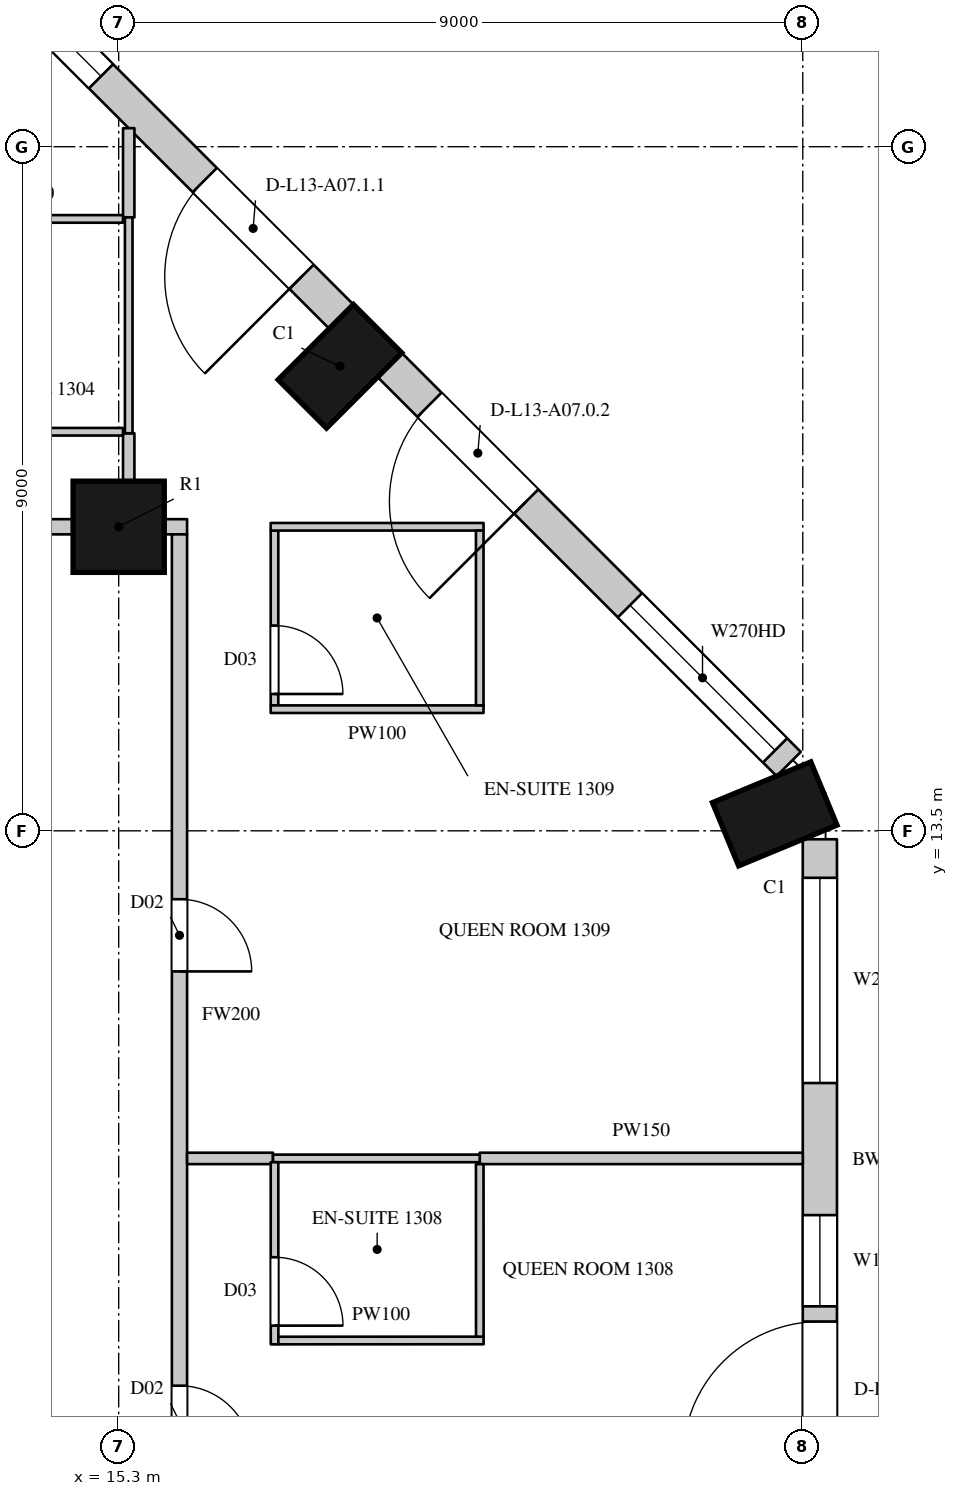
"""IFC4 building model, lengths in metres.
Left out: names, types, materials, properties, quantities, classifications, styles, units other than length and angle.
Written with IfcOpenShell. Run it as: python <this file> out.ifc"""

import sys

from ifc_helpers import new_model, si_unit, direction, frame, frame_2d, origin, origin_2d, place, context, subcontext, project, spatial, rectangle, circle, extrude, element, fill, save


model = new_model("IFC4")
c1 = context("Model", 3, precision=1e-05, world=origin(), true_north=direction((0.0, 1.0)))
c2 = subcontext(c1, "Body", "Model", "MODEL_VIEW")
j1 = project(units=[si_unit("LENGTHUNIT", "METRE"), si_unit("PLANEANGLEUNIT", "RADIAN")], contexts=[c1])
p1 = place(None, origin())
s1 = spatial("IfcSite", under=j1, at=p1, CompositionType="ELEMENT")
p2 = place(p1, origin())
s2 = spatial("IfcBuilding", under=s1, at=p2, CompositionType="ELEMENT")
p3 = place(p2, frame((0.0, 0.0, 77.1)))
s3 = spatial("IfcBuildingStorey", under=s2, at=p3, CompositionType="ELEMENT", Elevation=77.1)
for number, where, z_axis, x_axis in (
    (1, (23.931, 13.723, 0.0), (0.0, 0.0, 1.0), (-0.383, 0.924, 0.0)),
    (2, (18.211, 19.611, 0.0), (0.0, 0.0, 1.0), (-0.707, 0.707, 0.0)),
):
    element("IfcColumn", number, at=place(p3, frame(where, z_axis=z_axis, x_axis=x_axis)), inside=s3, PredefinedType="COLUMN", context=c2, shape_type="SweptSolid", body=[
        extrude(rectangle(XDim=0.9, YDim=1.4, at=origin_2d()), origin(), (0.0, 0.0, 1.0), 3.6),
    ])
p4 = place(p3, frame((15.3, 17.5, 0.0), z_axis=(0.0, 0.0, 1.0), x_axis=(1.0, 0.0, 0.0)))
e3 = element("IfcColumn", 3, at=p4, inside=s3, PredefinedType="COLUMN", context=c2, shape_type="SweptSolid", body=[
    extrude(circle(Radius=0.6, at=origin_2d()), origin(), (0.0, 0.0, 1.0), 3.6),
])
p5 = place(p3, frame((24.525, 4.95, 0.0), z_axis=(0.0, 0.0, 1.0), x_axis=(0.0, 1.0, 0.0)))
e4 = element("IfcWall", 4, at=p5, inside=s3, PredefinedType="SOLIDWALL", context=c2, shape_type="SweptSolid", body=[
    extrude(rectangle(XDim=8.439, YDim=0.45, at=frame_2d((4.219, 0.0))), origin(), (0.0, 0.0, 1.0), 3.3),
])
p6 = place(p5, frame((0.294, 0.0, 0.0)))
e5 = element("IfcOpeningElement", 5, at=p6, cuts=e4, PredefinedType="OPENING", context=c2, shape_type="SweptSolid", body=[
    extrude(rectangle(XDim=1.8, YDim=2.4, at=frame_2d((0.9, 1.2))), frame((0.0, 0.235, 0.0), z_axis=(0.0, -1.0, 0.0), x_axis=(1.0, 0.0, 0.0)), (0.0, 0.0, 1.0), 0.47),
])
p7 = place(p5, frame((2.294, 0.0, 1.05)))
e6 = element("IfcOpeningElement", 6, at=p7, cuts=e4, PredefinedType="OPENING", context=c2, shape_type="SweptSolid", body=[
    extrude(rectangle(XDim=1.2, YDim=2.0, at=frame_2d((0.6, 1.0))), frame((0.0, 0.235, 0.0), z_axis=(0.0, -1.0, 0.0), x_axis=(1.0, 0.0, 0.0)), (0.0, 0.0, 1.0), 0.47),
])
p8 = place(p5, frame((5.232, 0.0, 1.05)))
e7 = element("IfcOpeningElement", 7, at=p8, cuts=e4, PredefinedType="OPENING", context=c2, shape_type="SweptSolid", body=[
    extrude(rectangle(XDim=2.7, YDim=2.0, at=frame_2d((1.35, 1.0))), frame((0.0, 0.235, 0.0), z_axis=(0.0, -1.0, 0.0), x_axis=(1.0, 0.0, 0.0)), (0.0, 0.0, 1.0), 0.47),
])
p9 = place(p3, frame((24.115, 14.379, 0.0), z_axis=(0.0, 0.0, 1.0), x_axis=(-0.707106781187, 0.707106781187, 0.0)))
e8 = element("IfcWall", 8, at=p9, inside=s3, PredefinedType="SOLIDWALL", context=c2, shape_type="SweptSolid", body=[
    extrude(rectangle(XDim=7.424, YDim=0.45, at=frame_2d((3.712, 0.0))), origin(), (0.0, 0.0, 1.0), 3.3),
])
p10 = place(p9, frame((0.253, 0.0, 1.05)))
e9 = element("IfcOpeningElement", 9, at=p10, cuts=e8, PredefinedType="OPENING", context=c2, shape_type="SweptSolid", body=[
    extrude(rectangle(XDim=2.7, YDim=2.0, at=frame_2d((1.35, 1.0))), frame((0.0, 0.235, 0.0), z_axis=(0.0, -1.0, 0.0), x_axis=(1.0, 0.0, 0.0)), (0.0, 0.0, 1.0), 0.47),
])
p11 = place(p9, frame((4.884, 0.0, 0.0)))
e10 = element("IfcOpeningElement", 10, at=p11, cuts=e8, PredefinedType="OPENING", context=c2, shape_type="SweptSolid", body=[
    extrude(rectangle(XDim=1.8, YDim=2.4, at=frame_2d((0.9, 1.2))), frame((0.0, 0.235, 0.0), z_axis=(0.0, -1.0, 0.0), x_axis=(1.0, 0.0, 0.0)), (0.0, 0.0, 1.0), 0.47),
])
p12 = place(p3, frame((18.229, 20.265, 0.0), z_axis=(0.0, 0.0, 1.0), x_axis=(-0.707106781187, 0.707106781187, 0.0)))
e11 = element("IfcWall", 11, at=p12, inside=s3, PredefinedType="SOLIDWALL", context=c2, shape_type="SweptSolid", body=[
    extrude(rectangle(XDim=7.424, YDim=0.45, at=frame_2d((3.712, 0.0))), origin(), (0.0, 0.0, 1.0), 3.3),
])
p13 = place(p12, frame((0.74, 0.0, 0.0)))
e12 = element("IfcOpeningElement", 12, at=p13, cuts=e11, PredefinedType="OPENING", context=c2, shape_type="SweptSolid", body=[
    extrude(rectangle(XDim=1.8, YDim=2.4, at=frame_2d((0.9, 1.2))), frame((0.0, 0.235, 0.0), z_axis=(0.0, -1.0, 0.0), x_axis=(1.0, 0.0, 0.0)), (0.0, 0.0, 1.0), 0.47),
])
p14 = place(p12, frame((4.471, 0.0, 1.05)))
e13 = element("IfcOpeningElement", 13, at=p14, cuts=e11, PredefinedType="OPENING", context=c2, shape_type="SweptSolid", body=[
    extrude(rectangle(XDim=2.7, YDim=2.0, at=frame_2d((1.35, 1.0))), frame((0.0, 0.235, 0.0), z_axis=(0.0, -1.0, 0.0), x_axis=(1.0, 0.0, 0.0)), (0.0, 0.0, 1.0), 0.47),
])
p15 = place(p3, frame((23.15, 16.864, 0.0), z_axis=(0.0, 0.0, 1.0), x_axis=(-0.707106781187, 0.707106781187, 0.0)))
e14 = element("IfcWall", 14, at=p15, inside=s3, PredefinedType="SOLIDWALL", context=c2, shape_type="SweptSolid", body=[
    extrude(rectangle(XDim=1.445, YDim=0.45, at=frame_2d((0.722, 0.0))), origin(), (0.0, 0.0, 1.0), 0.6),
])
p16 = place(p3, frame((19.937, 20.078, 0.0), z_axis=(0.0, 0.0, 1.0), x_axis=(-0.707106781187, 0.707106781187, 0.0)))
e15 = element("IfcWall", 15, at=p16, inside=s3, PredefinedType="SOLIDWALL", context=c2, shape_type="SweptSolid", body=[
    extrude(rectangle(XDim=1.781, YDim=0.45, at=frame_2d((0.89, 0.0))), origin(), (0.0, 0.0, 1.0), 0.6),
])
p17 = place(p3, frame((16.486, 23.529, 0.0), z_axis=(0.0, 0.0, 1.0), x_axis=(-0.707022305137, 0.707191247145, 0.0)))
e16 = element("IfcWall", 16, at=p17, inside=s3, PredefinedType="SOLIDWALL", context=c2, shape_type="SweptSolid", body=[
    extrude(rectangle(XDim=1.445, YDim=0.45, at=frame_2d((0.723, 0.0))), origin(), (0.0, 0.0, 1.0), 0.6),
])
p18 = place(p3, frame((6.9, 17.5, 0.0), z_axis=(0.0, 0.0, 1.0), x_axis=(1.0, 0.0, 0.0)))
e17 = element("IfcWall", 17, at=p18, inside=s3, PredefinedType="PARTITIONING", context=c2, shape_type="SweptSolid", body=[
    extrude(rectangle(XDim=7.8, YDim=0.2, at=frame_2d((3.9, 0.0))), origin(), (0.0, 0.0, 1.0), 2.75),
])
p19 = place(p18, frame((1.45, 0.0, 0.0)))
e18 = element("IfcOpeningElement", 18, at=p19, cuts=e17, PredefinedType="OPENING", context=c2, shape_type="SweptSolid", body=[
    extrude(rectangle(XDim=1.1, YDim=2.4, at=frame_2d((0.55, 1.2))), frame((0.0, 0.11, 0.0), z_axis=(0.0, -1.0, 0.0), x_axis=(1.0, 0.0, 0.0)), (0.0, 0.0, 1.0), 0.22),
])
p20 = place(p3, frame((15.9, 17.5, 0.0), z_axis=(0.0, 0.0, 1.0), x_axis=(1.0, 0.0, 0.0)))
e19 = element("IfcWall", 19, at=p20, inside=s3, PredefinedType="PARTITIONING", context=c2, shape_type="SweptSolid", body=[
    extrude(rectangle(XDim=0.3, YDim=0.2, at=frame_2d((0.15, 0.0))), origin(), (0.0, 0.0, 1.0), 3.3),
])
p21 = place(p3, frame((16.1, 4.75, 0.0), z_axis=(0.0, 0.0, 1.0), x_axis=(0.0, 1.0, 0.0)))
e20 = element("IfcWall", 20, at=p21, inside=s3, PredefinedType="PARTITIONING", context=c2, shape_type="SweptSolid", body=[
    extrude(rectangle(XDim=12.65, YDim=0.2, at=frame_2d((6.325, 0.0))), origin(), (0.0, 0.0, 1.0), 3.3),
])
p22 = place(p21, frame((0.5, 0.0, 0.0)))
e21 = element("IfcOpeningElement", 21, at=p22, cuts=e20, PredefinedType="OPENING", context=c2, shape_type="SweptSolid", body=[
    extrude(rectangle(XDim=0.95, YDim=2.2, at=frame_2d((0.475, 1.1))), frame((0.0, 0.11, 0.0), z_axis=(0.0, -1.0, 0.0), x_axis=(1.0, 0.0, 0.0)), (0.0, 0.0, 1.0), 0.22),
])
p23 = place(p21, frame((6.9, 0.0, 0.0)))
e22 = element("IfcOpeningElement", 22, at=p23, cuts=e20, PredefinedType="OPENING", context=c2, shape_type="SweptSolid", body=[
    extrude(rectangle(XDim=0.95, YDim=2.2, at=frame_2d((0.475, 1.1))), frame((0.0, 0.11, 0.0), z_axis=(0.0, -1.0, 0.0), x_axis=(1.0, 0.0, 0.0)), (0.0, 0.0, 1.0), 0.22),
])
p24 = place(p3, frame((15.432, 18.094, 0.0), z_axis=(0.0, 0.0, 1.0), x_axis=(0.0, 1.0, 0.0)))
e23 = element("IfcWall", 23, at=p24, inside=s3, PredefinedType="PARTITIONING", context=c2, shape_type="SweptSolid", body=[
    extrude(rectangle(XDim=0.636, YDim=0.15, at=frame_2d((0.318, 0.0))), origin(), (0.0, 0.0, 1.0), 3.3),
])
p25 = place(p3, frame((15.432, 21.57, 0.0), z_axis=(0.0, 0.0, 1.0), x_axis=(0.0, 1.0, 0.0)))
e24 = element("IfcWall", 24, at=p25, inside=s3, PredefinedType="PARTITIONING", context=c2, shape_type="SweptSolid", body=[
    extrude(rectangle(XDim=1.174, YDim=0.15, at=frame_2d((0.587, 0.0))), origin(), (0.0, 0.0, 1.0), 3.3),
])
p26 = place(p3, frame((16.2, 9.19, 0.0), z_axis=(0.0, 0.0, 1.0), x_axis=(1.0, 0.0, 0.0)))
e25 = element("IfcWall", 25, at=p26, inside=s3, PredefinedType="PARTITIONING", context=c2, shape_type="SweptSolid", body=[
    extrude(rectangle(XDim=1.13, YDim=0.15, at=frame_2d((0.565, 0.0))), origin(), (0.0, 0.0, 1.0), 2.65),
])
p27 = place(p3, frame((20.05, 9.19, 0.0), z_axis=(0.0, 0.0, 1.0), x_axis=(1.0, 0.0, 0.0)))
e26 = element("IfcWall", 26, at=p27, inside=s3, PredefinedType="PARTITIONING", context=c2, shape_type="SweptSolid", body=[
    extrude(rectangle(XDim=4.25, YDim=0.15, at=frame_2d((2.125, 0.0))), origin(), (0.0, 0.0, 1.0), 2.65),
])
for number, where, z_axis, x_axis in (
    (27, (12.786, 18.75, 0.0), (0.0, 0.0, 1.0), (1.0, 0.0, 0.0)),
    (28, (12.786, 21.55, 0.0), (0.0, 0.0, 1.0), (1.0, 0.0, 0.0)),
):
    element("IfcWall", number, at=place(p3, frame(where, z_axis=z_axis, x_axis=x_axis)), inside=s3, PredefinedType="PARTITIONING", context=c2, shape_type="SweptSolid", body=[
        extrude(rectangle(XDim=2.571, YDim=0.1, at=frame_2d((1.286, 0.0))), origin(), (0.0, 0.0, 1.0), 3.3),
    ])
p28 = place(p3, frame((15.432, 18.73, 0.0), z_axis=(0.0, 0.0, 1.0), x_axis=(0.0, 1.0, 0.0)))
e29 = element("IfcWall", 29, at=p28, inside=s3, PredefinedType="PARTITIONING", context=c2, shape_type="SweptSolid", body=[
    extrude(rectangle(XDim=2.84, YDim=0.1, at=frame_2d((1.42, 0.0))), origin(), (0.0, 0.0, 1.0), 3.3),
])
p29 = place(p3, frame((17.33, 9.19, 0.0), z_axis=(0.0, 0.0, 1.0), x_axis=(1.0, 0.0, 0.0)))
e30 = element("IfcWall", 30, at=p29, inside=s3, PredefinedType="PARTITIONING", context=c2, shape_type="SweptSolid", body=[
    extrude(rectangle(XDim=2.72, YDim=0.1, at=frame_2d((1.36, 0.0))), origin(), (0.0, 0.0, 1.0), 2.65),
])
p30 = place(p3, frame((17.35, 9.14, 0.0), z_axis=(0.0, 0.0, 1.0), x_axis=(0.000407580973, -0.999999916939, 0.0)))
e31 = element("IfcWall", 31, at=p30, inside=s3, PredefinedType="PARTITIONING", context=c2, shape_type="SweptSolid", body=[
    extrude(rectangle(XDim=2.396, YDim=0.1, at=frame_2d((1.198, 0.0))), origin(), (0.0, 0.0, 1.0), 3.3),
])
p31 = place(p30, frame((1.25, 0.0, 0.0)))
e32 = element("IfcOpeningElement", 32, at=p31, cuts=e31, PredefinedType="OPENING", context=c2, shape_type="SweptSolid", body=[
    extrude(rectangle(XDim=0.9, YDim=2.2, at=frame_2d((0.45, 1.1))), frame((0.0, 0.06, 0.0), z_axis=(0.0, -1.0, 0.0), x_axis=(1.0, 0.0, 0.0)), (0.0, 0.0, 1.0), 0.12),
])
p32 = place(p3, frame((17.35, 15.15, 0.0), z_axis=(0.0, 0.0, 1.0), x_axis=(0.0, 1.0, 0.0)))
e33 = element("IfcWall", 33, at=p32, inside=s3, PredefinedType="PARTITIONING", context=c2, shape_type="SweptSolid", body=[
    extrude(rectangle(XDim=2.3, YDim=0.1, at=frame_2d((1.15, 0.0))), origin(), (0.0, 0.0, 1.0), 3.3),
])
p33 = place(p32, frame((0.15, 0.0, 0.0)))
e34 = element("IfcOpeningElement", 34, at=p33, cuts=e33, PredefinedType="OPENING", context=c2, shape_type="SweptSolid", body=[
    extrude(rectangle(XDim=0.9, YDim=2.2, at=frame_2d((0.45, 1.1))), frame((0.0, 0.06, 0.0), z_axis=(0.0, -1.0, 0.0), x_axis=(1.0, 0.0, 0.0)), (0.0, 0.0, 1.0), 0.12),
])
for number, where, z_axis, x_axis in (
    (35, (17.3, 15.1, 0.0), (0.0, 0.0, 1.0), (1.0, 0.0, 0.0)),
    (36, (17.3, 17.5, 0.0), (0.0, 0.0, 1.0), (1.0, 0.0, 0.0)),
):
    element("IfcWall", number, at=place(p3, frame(where, z_axis=z_axis, x_axis=x_axis)), inside=s3, PredefinedType="PARTITIONING", context=c2, shape_type="SweptSolid", body=[
        extrude(rectangle(XDim=2.8, YDim=0.1, at=frame_2d((1.4, 0.0))), origin(), (0.0, 0.0, 1.0), 3.3),
    ])
p34 = place(p3, frame((17.401, 6.794, 0.0), z_axis=(0.0, 0.0, 1.0), x_axis=(0.9999999346, 0.000361663629, 0.0)))
e37 = element("IfcWall", 37, at=p34, inside=s3, PredefinedType="PARTITIONING", context=c2, shape_type="SweptSolid", body=[
    extrude(rectangle(XDim=2.7, YDim=0.1, at=frame_2d((1.35, 0.0))), origin(), (0.0, 0.0, 1.0), 3.3),
])
p35 = place(p3, frame((20.05, 9.115, 0.0), z_axis=(0.0, 0.0, 1.0), x_axis=(0.000430200003, -0.999999907464, 0.0)))
e38 = element("IfcWall", 38, at=p35, inside=s3, PredefinedType="PARTITIONING", context=c2, shape_type="SweptSolid", body=[
    extrude(rectangle(XDim=2.27, YDim=0.1, at=frame_2d((1.135, 0.0))), origin(), (0.0, 0.0, 1.0), 3.3),
])
p36 = place(p3, frame((20.05, 15.15, 0.0), z_axis=(0.0, 0.0, 1.0), x_axis=(0.0, 1.0, 0.0)))
e39 = element("IfcWall", 39, at=p36, inside=s3, PredefinedType="PARTITIONING", context=c2, shape_type="SweptSolid", body=[
    extrude(rectangle(XDim=2.3, YDim=0.1, at=frame_2d((1.15, 0.0))), origin(), (0.0, 0.0, 1.0), 3.3),
])
p37 = place(p6, origin())
e40 = element("IfcDoor", 40, at=p37, inside=s3, OperationType="SLIDING_TO_LEFT", PredefinedType="DOOR", context=c2, shape_type="SweptSolid", body=[
    extrude(rectangle(XDim=1.8, YDim=2.4, at=frame_2d((0.9, 1.2))), frame((0.0, 0.13, 0.0), z_axis=(0.0, -1.0, 0.0), x_axis=(1.0, 0.0, 0.0)), (0.0, 0.0, 1.0), 0.05),
])
fill(e5, e40)
p38 = place(p7, origin())
e41 = element("IfcWindow", 41, at=p38, inside=s3, PartitioningType="SINGLE_PANEL", PredefinedType="WINDOW", context=c2, shape_type="SweptSolid", body=[
    extrude(rectangle(XDim=1.2, YDim=2.0, at=frame_2d((0.6, 1.0))), frame((0.0, 0.135, 0.0), z_axis=(0.0, -1.0, 0.0), x_axis=(1.0, 0.0, 0.0)), (0.0, 0.0, 1.0), 0.06),
])
fill(e6, e41)
p39 = place(p8, origin())
e42 = element("IfcWindow", 42, at=p39, inside=s3, PartitioningType="SINGLE_PANEL", PredefinedType="WINDOW", context=c2, shape_type="SweptSolid", body=[
    extrude(rectangle(XDim=2.7, YDim=2.0, at=frame_2d((1.35, 1.0))), frame((0.0, 0.135, 0.0), z_axis=(0.0, -1.0, 0.0), x_axis=(1.0, 0.0, 0.0)), (0.0, 0.0, 1.0), 0.06),
])
fill(e7, e42)
p40 = place(p10, origin())
e43 = element("IfcWindow", 43, at=p40, inside=s3, PartitioningType="SINGLE_PANEL", PredefinedType="WINDOW", context=c2, shape_type="SweptSolid", body=[
    extrude(rectangle(XDim=2.7, YDim=2.0, at=frame_2d((1.35, 1.0))), frame((0.0, 0.135, 0.0), z_axis=(0.0, -1.0, 0.0), x_axis=(1.0, 0.0, 0.0)), (0.0, 0.0, 1.0), 0.06),
])
fill(e9, e43)
p41 = place(p11, origin())
e44 = element("IfcDoor", 44, at=p41, inside=s3, OperationType="SLIDING_TO_LEFT", PredefinedType="DOOR", context=c2, shape_type="SweptSolid", body=[
    extrude(rectangle(XDim=1.8, YDim=2.4, at=frame_2d((0.9, 1.2))), frame((0.0, 0.13, 0.0), z_axis=(0.0, -1.0, 0.0), x_axis=(1.0, 0.0, 0.0)), (0.0, 0.0, 1.0), 0.05),
])
fill(e10, e44)
p42 = place(p13, origin())
e45 = element("IfcDoor", 45, at=p42, inside=s3, OperationType="SLIDING_TO_LEFT", PredefinedType="DOOR", context=c2, shape_type="SweptSolid", body=[
    extrude(rectangle(XDim=1.8, YDim=2.4, at=frame_2d((0.9, 1.2))), frame((0.0, 0.13, 0.0), z_axis=(0.0, -1.0, 0.0), x_axis=(1.0, 0.0, 0.0)), (0.0, 0.0, 1.0), 0.05),
])
fill(e12, e45)
p43 = place(p14, origin())
e46 = element("IfcWindow", 46, at=p43, inside=s3, PartitioningType="SINGLE_PANEL", PredefinedType="WINDOW", context=c2, shape_type="SweptSolid", body=[
    extrude(rectangle(XDim=2.7, YDim=2.0, at=frame_2d((1.35, 1.0))), frame((0.0, 0.135, 0.0), z_axis=(0.0, -1.0, 0.0), x_axis=(1.0, 0.0, 0.0)), (0.0, 0.0, 1.0), 0.06),
])
fill(e13, e46)
p44 = place(p22, origin())
e47 = element("IfcDoor", 47, at=p44, inside=s3, OperationType="SINGLE_SWING_RIGHT", PredefinedType="DOOR", context=c2, shape_type="SweptSolid", body=[
    extrude(rectangle(XDim=0.95, YDim=2.2, at=frame_2d((0.475, 1.1))), frame((0.0, 0.025, 0.0), z_axis=(0.0, -1.0, 0.0), x_axis=(1.0, 0.0, 0.0)), (0.0, 0.0, 1.0), 0.05),
])
fill(e21, e47)
p45 = place(p31, origin())
e48 = element("IfcDoor", 48, at=p45, inside=s3, OperationType="SINGLE_SWING_RIGHT", PredefinedType="DOOR", context=c2, shape_type="SweptSolid", body=[
    extrude(rectangle(XDim=0.9, YDim=2.2, at=frame_2d((0.45, 1.1))), frame((0.0, 0.025, 0.0), z_axis=(0.0, -1.0, 0.0), x_axis=(1.0, 0.0, 0.0)), (0.0, 0.0, 1.0), 0.05),
])
fill(e32, e48)
p46 = place(p23, origin())
e49 = element("IfcDoor", 49, at=p46, inside=s3, OperationType="SINGLE_SWING_RIGHT", PredefinedType="DOOR", context=c2, shape_type="SweptSolid", body=[
    extrude(rectangle(XDim=0.95, YDim=2.2, at=frame_2d((0.475, 1.1))), frame((0.0, 0.025, 0.0), z_axis=(0.0, -1.0, 0.0), x_axis=(1.0, 0.0, 0.0)), (0.0, 0.0, 1.0), 0.05),
])
fill(e22, e49)
p47 = place(p33, origin())
e50 = element("IfcDoor", 50, at=p47, inside=s3, OperationType="SINGLE_SWING_RIGHT", PredefinedType="DOOR", context=c2, shape_type="SweptSolid", body=[
    extrude(rectangle(XDim=0.9, YDim=2.2, at=frame_2d((0.45, 1.1))), frame((0.0, 0.025, 0.0), z_axis=(0.0, -1.0, 0.0), x_axis=(1.0, 0.0, 0.0)), (0.0, 0.0, 1.0), 0.05),
])
fill(e34, e50)
save(model, sys.argv[1])
